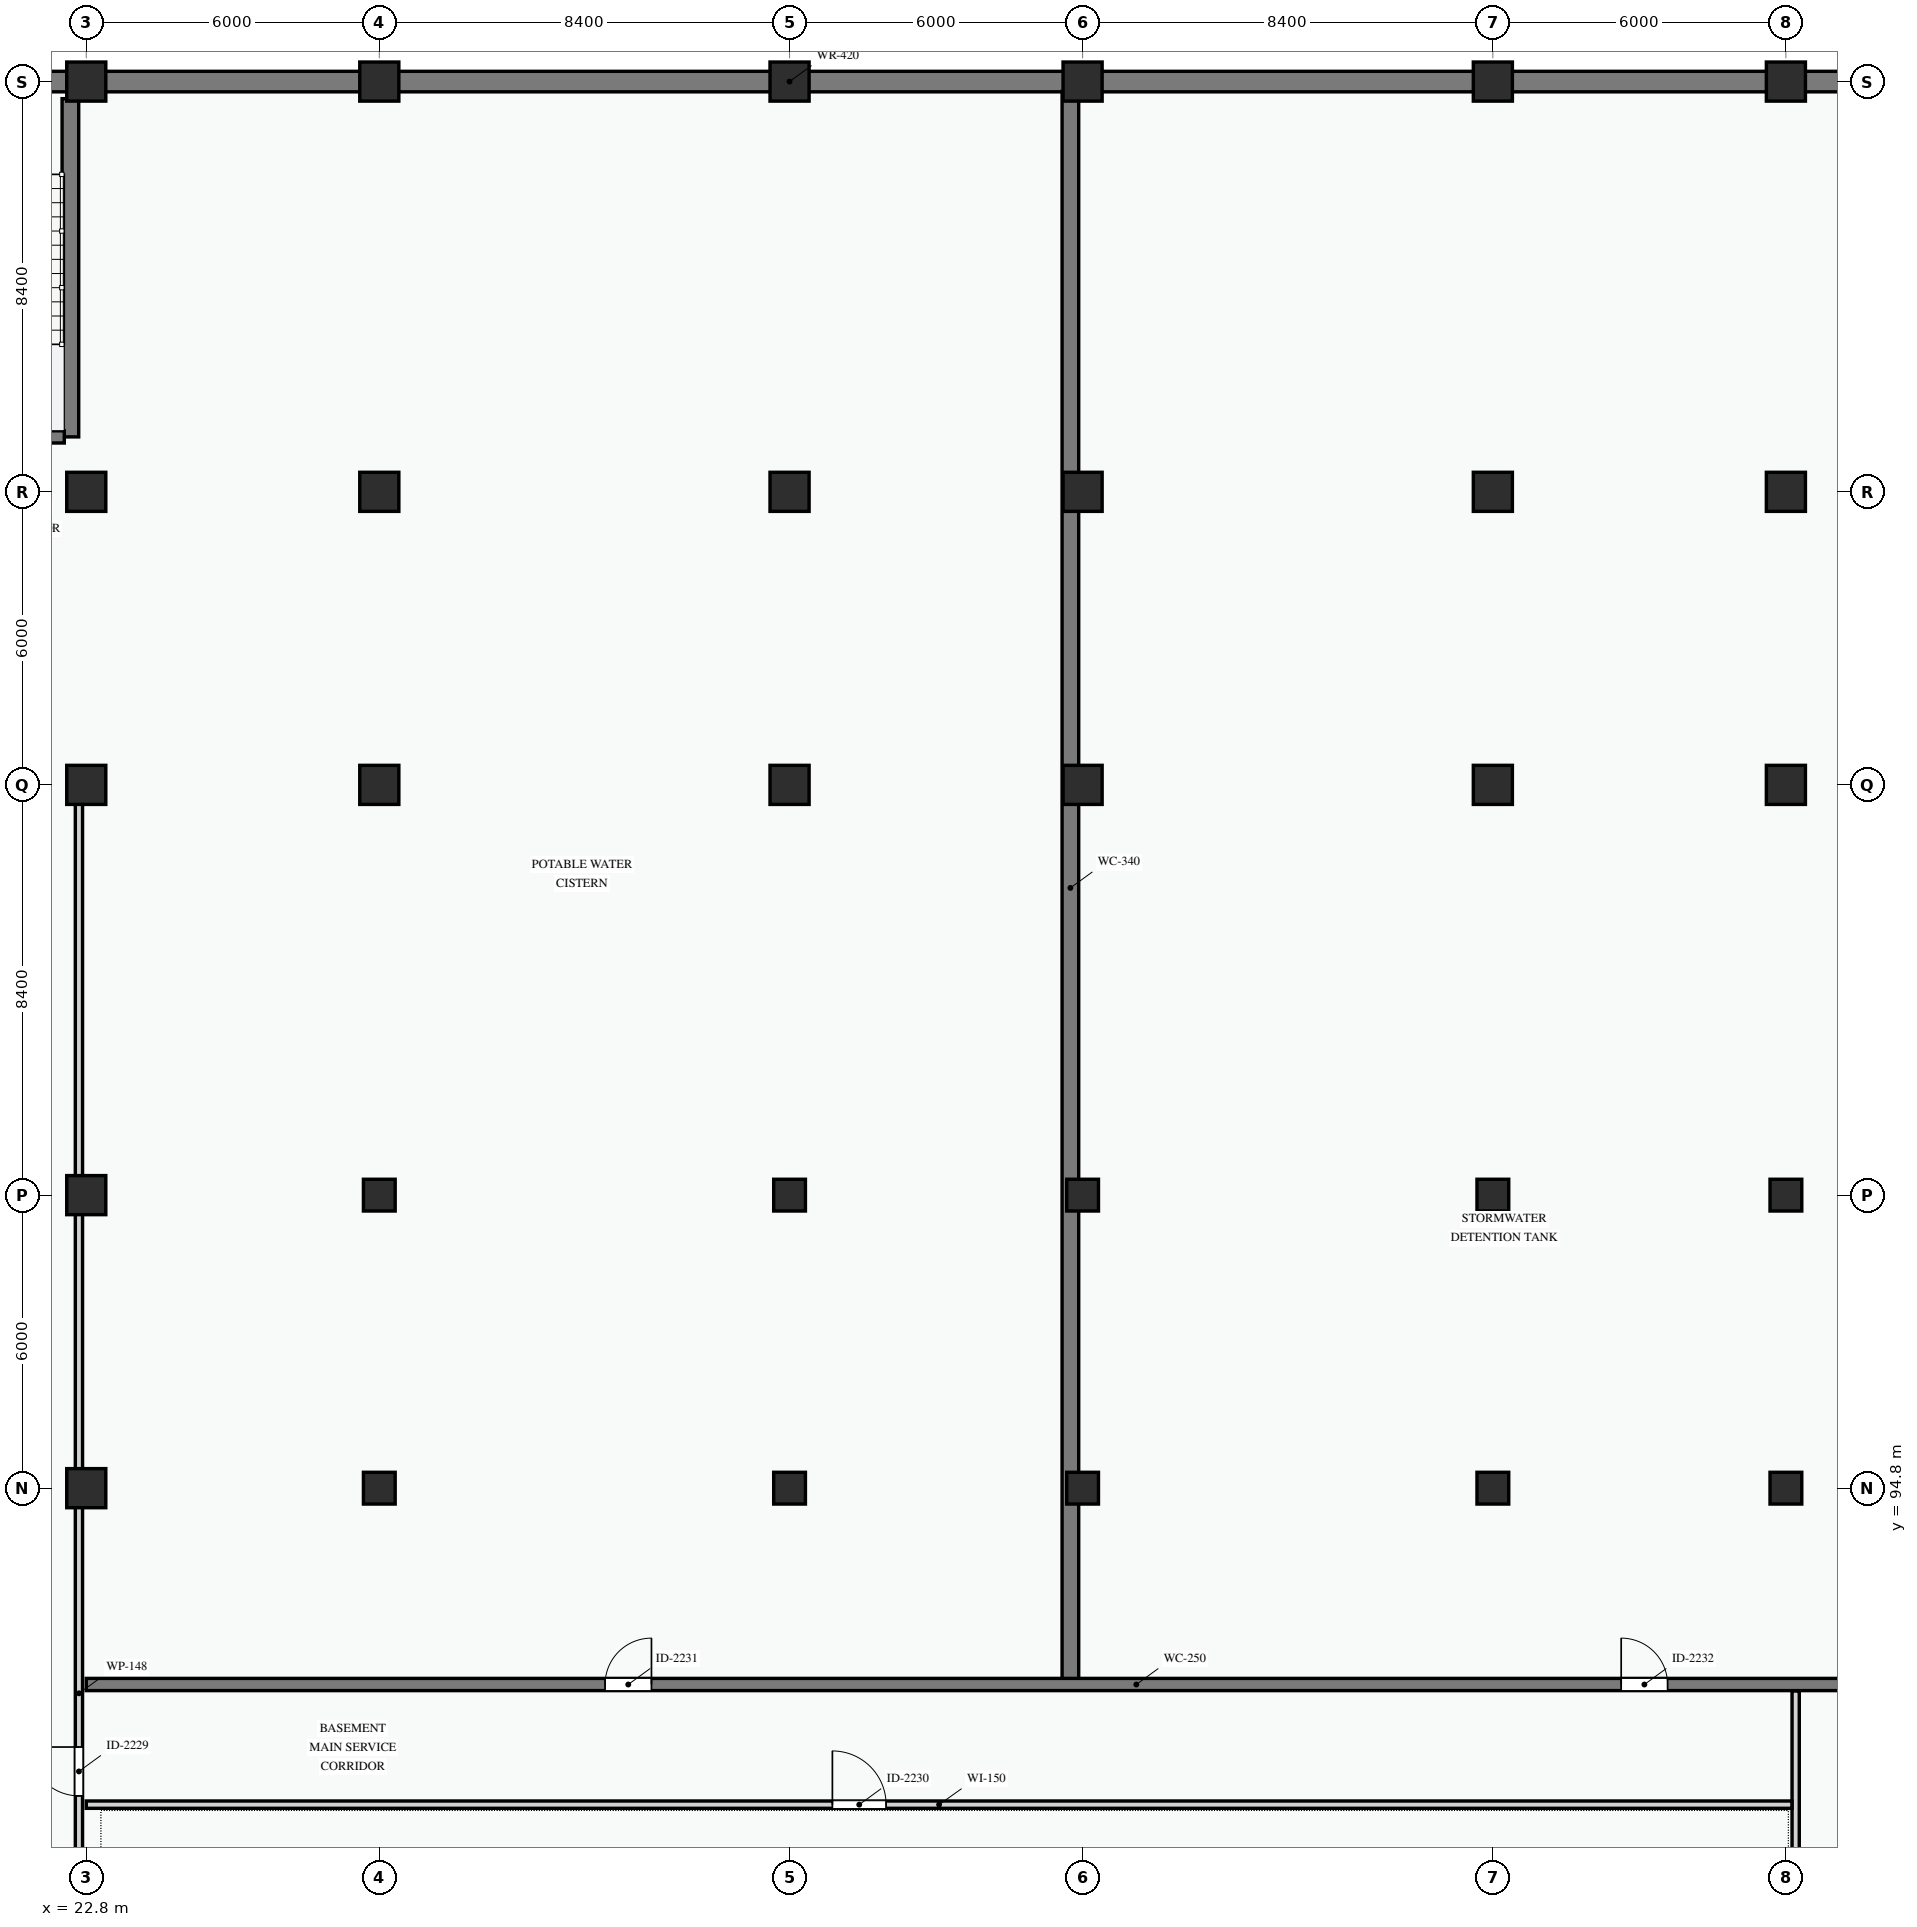
"""IFC4 building model, lengths in metres.
Left out: names, types, materials, properties, quantities, classifications, styles, units other than length and angle.
Written with IfcOpenShell. Run it as: python <this file> out.ifc"""

import sys

from ifc_helpers import new_model, si_unit, direction, frame, frame_2d, origin, origin_2d, place, context, subcontext, project, spatial, rectangle, extrude, element, fill, save


model = new_model("IFC4")
c1 = context("Model", 3, precision=1e-05, world=origin(), true_north=direction((0.0, 1.0)))
c2 = subcontext(c1, "Body", "Model", "MODEL_VIEW")
j1 = project(units=[si_unit("LENGTHUNIT", "METRE"), si_unit("PLANEANGLEUNIT", "RADIAN")], contexts=[c1])
p1 = place(None, origin())
s1 = spatial("IfcSite", under=j1, at=p1, CompositionType="ELEMENT")
p2 = place(p1, origin())
s2 = spatial("IfcBuilding", under=s1, at=p2, CompositionType="ELEMENT")
p3 = place(p2, frame((0.0, 0.0, -4.2)))
s3 = spatial("IfcBuildingStorey", under=s2, at=p3, CompositionType="ELEMENT", Elevation=-4.2)
for number, where, z_axis, x_axis in (
    (1, (22.8, 94.8, -0.45), (0.0, 0.0, 1.0), (1.0, 0.0, 0.0)),
    (2, (22.8, 100.8, -0.45), (0.0, 0.0, 1.0), (1.0, 0.0, 0.0)),
    (3, (22.8, 109.2, -0.45), (0.0, 0.0, 1.0), (1.0, 0.0, 0.0)),
    (4, (22.8, 115.2, -0.45), (0.0, 0.0, 1.0), (1.0, 0.0, 0.0)),
    (5, (22.8, 123.6, -0.45), (0.0, 0.0, 1.0), (1.0, 0.0, 0.0)),
):
    element("IfcColumn", number, at=place(p3, frame(where, z_axis=z_axis, x_axis=x_axis)), inside=s3, PredefinedType="COLUMN", context=c2, shape_type="SweptSolid", body=[
        extrude(rectangle(XDim=0.8, YDim=0.8, at=origin_2d()), origin(), (0.0, 0.0, 1.0), 4.65),
    ])
for number, where, z_axis, x_axis in (
    (6, (28.8, 94.8, -0.45), (0.0, 0.0, 1.0), (1.0, 0.0, 0.0)),
    (7, (28.8, 100.8, -0.45), (0.0, 0.0, 1.0), (1.0, 0.0, 0.0)),
):
    element("IfcColumn", number, at=place(p3, frame(where, z_axis=z_axis, x_axis=x_axis)), inside=s3, PredefinedType="COLUMN", context=c2, shape_type="SweptSolid", body=[
        extrude(rectangle(XDim=0.65, YDim=0.65, at=origin_2d()), origin(), (0.0, 0.0, 1.0), 4.65),
    ])
for number, where, z_axis, x_axis in (
    (8, (28.8, 109.2, -0.45), (0.0, 0.0, 1.0), (1.0, 0.0, 0.0)),
    (9, (28.8, 115.2, -0.45), (0.0, 0.0, 1.0), (1.0, 0.0, 0.0)),
    (10, (28.8, 123.6, -0.45), (0.0, 0.0, 1.0), (1.0, 0.0, 0.0)),
):
    element("IfcColumn", number, at=place(p3, frame(where, z_axis=z_axis, x_axis=x_axis)), inside=s3, PredefinedType="COLUMN", context=c2, shape_type="SweptSolid", body=[
        extrude(rectangle(XDim=0.8, YDim=0.8, at=origin_2d()), origin(), (0.0, 0.0, 1.0), 4.65),
    ])
for number, where, z_axis, x_axis in (
    (11, (37.2, 94.8, -0.45), (0.0, 0.0, 1.0), (1.0, 0.0, 0.0)),
    (12, (37.2, 100.8, -0.45), (0.0, 0.0, 1.0), (1.0, 0.0, 0.0)),
):
    element("IfcColumn", number, at=place(p3, frame(where, z_axis=z_axis, x_axis=x_axis)), inside=s3, PredefinedType="COLUMN", context=c2, shape_type="SweptSolid", body=[
        extrude(rectangle(XDim=0.65, YDim=0.65, at=origin_2d()), origin(), (0.0, 0.0, 1.0), 4.65),
    ])
for number, where, z_axis, x_axis in (
    (13, (37.2, 109.2, -0.45), (0.0, 0.0, 1.0), (1.0, 0.0, 0.0)),
    (14, (37.2, 115.2, -0.45), (0.0, 0.0, 1.0), (1.0, 0.0, 0.0)),
    (15, (37.2, 123.6, -0.45), (0.0, 0.0, 1.0), (1.0, 0.0, 0.0)),
):
    element("IfcColumn", number, at=place(p3, frame(where, z_axis=z_axis, x_axis=x_axis)), inside=s3, PredefinedType="COLUMN", context=c2, shape_type="SweptSolid", body=[
        extrude(rectangle(XDim=0.8, YDim=0.8, at=origin_2d()), origin(), (0.0, 0.0, 1.0), 4.65),
    ])
for number, where, z_axis, x_axis in (
    (16, (43.2, 94.8, -0.45), (0.0, 0.0, 1.0), (1.0, 0.0, 0.0)),
    (17, (43.2, 100.8, -0.45), (0.0, 0.0, 1.0), (1.0, 0.0, 0.0)),
):
    element("IfcColumn", number, at=place(p3, frame(where, z_axis=z_axis, x_axis=x_axis)), inside=s3, PredefinedType="COLUMN", context=c2, shape_type="SweptSolid", body=[
        extrude(rectangle(XDim=0.65, YDim=0.65, at=origin_2d()), origin(), (0.0, 0.0, 1.0), 4.65),
    ])
for number, where, z_axis, x_axis in (
    (18, (43.2, 109.2, -0.45), (0.0, 0.0, 1.0), (1.0, 0.0, 0.0)),
    (19, (43.2, 115.2, -0.45), (0.0, 0.0, 1.0), (1.0, 0.0, 0.0)),
    (20, (43.2, 123.6, -0.45), (0.0, 0.0, 1.0), (1.0, 0.0, 0.0)),
):
    element("IfcColumn", number, at=place(p3, frame(where, z_axis=z_axis, x_axis=x_axis)), inside=s3, PredefinedType="COLUMN", context=c2, shape_type="SweptSolid", body=[
        extrude(rectangle(XDim=0.8, YDim=0.8, at=origin_2d()), origin(), (0.0, 0.0, 1.0), 4.65),
    ])
for number, where, z_axis, x_axis in (
    (21, (51.6, 94.8, -0.45), (0.0, 0.0, 1.0), (1.0, 0.0, 0.0)),
    (22, (51.6, 100.8, -0.45), (0.0, 0.0, 1.0), (1.0, 0.0, 0.0)),
):
    element("IfcColumn", number, at=place(p3, frame(where, z_axis=z_axis, x_axis=x_axis)), inside=s3, PredefinedType="COLUMN", context=c2, shape_type="SweptSolid", body=[
        extrude(rectangle(XDim=0.65, YDim=0.65, at=origin_2d()), origin(), (0.0, 0.0, 1.0), 4.65),
    ])
for number, where, z_axis, x_axis in (
    (23, (51.6, 109.2, -0.45), (0.0, 0.0, 1.0), (1.0, 0.0, 0.0)),
    (24, (51.6, 115.2, -0.45), (0.0, 0.0, 1.0), (1.0, 0.0, 0.0)),
    (25, (51.6, 123.6, -0.45), (0.0, 0.0, 1.0), (1.0, 0.0, 0.0)),
):
    element("IfcColumn", number, at=place(p3, frame(where, z_axis=z_axis, x_axis=x_axis)), inside=s3, PredefinedType="COLUMN", context=c2, shape_type="SweptSolid", body=[
        extrude(rectangle(XDim=0.8, YDim=0.8, at=origin_2d()), origin(), (0.0, 0.0, 1.0), 4.65),
    ])
for number, where, z_axis, x_axis in (
    (26, (57.6, 94.8, -0.45), (0.0, 0.0, 1.0), (1.0, 0.0, 0.0)),
    (27, (57.6, 100.8, -0.45), (0.0, 0.0, 1.0), (1.0, 0.0, 0.0)),
):
    element("IfcColumn", number, at=place(p3, frame(where, z_axis=z_axis, x_axis=x_axis)), inside=s3, PredefinedType="COLUMN", context=c2, shape_type="SweptSolid", body=[
        extrude(rectangle(XDim=0.65, YDim=0.65, at=origin_2d()), origin(), (0.0, 0.0, 1.0), 4.65),
    ])
for number, where, z_axis, x_axis in (
    (28, (57.6, 109.2, -0.45), (0.0, 0.0, 1.0), (1.0, 0.0, 0.0)),
    (29, (57.6, 115.2, -0.45), (0.0, 0.0, 1.0), (1.0, 0.0, 0.0)),
    (30, (57.6, 123.6, -0.45), (0.0, 0.0, 1.0), (1.0, 0.0, 0.0)),
):
    element("IfcColumn", number, at=place(p3, frame(where, z_axis=z_axis, x_axis=x_axis)), inside=s3, PredefinedType="COLUMN", context=c2, shape_type="SweptSolid", body=[
        extrude(rectangle(XDim=0.8, YDim=0.8, at=origin_2d()), origin(), (0.0, 0.0, 1.0), 4.65),
    ])
p4 = place(p3, frame((66.0, 123.6, 0.0), z_axis=(0.0, 0.0, 1.0), x_axis=(-1.0, 0.0, 0.0)))
e31 = element("IfcWall", 31, at=p4, inside=s3, PredefinedType="SHEAR", context=c2, shape_type="SweptSolid", body=[
    extrude(rectangle(XDim=57.6, YDim=0.42, at=frame_2d((28.8, 0.0))), origin(), (0.0, 0.0, 1.0), 3.9),
])
p5 = place(p3, frame((22.475, 123.25, 0.0), z_axis=(0.0, 0.0, 1.0), x_axis=(0.0, -1.0, 0.0)))
e32 = element("IfcWall", 32, at=p5, inside=s3, PredefinedType="SHEAR", context=c2, shape_type="SweptSolid", body=[
    extrude(rectangle(XDim=6.925, YDim=0.34, at=frame_2d((3.462, 0.0))), origin(), (0.0, 0.0, 1.0), 3.9),
])
p6 = place(p3, frame((8.85, 116.325, 0.0), z_axis=(0.0, 0.0, 1.0), x_axis=(1.0, 0.0, 0.0)))
e33 = element("IfcWall", 33, at=p6, inside=s3, PredefinedType="SHEAR", context=c2, shape_type="SweptSolid", body=[
    extrude(rectangle(XDim=13.5, YDim=0.25, at=frame_2d((6.75, 0.0))), origin(), (0.0, 0.0, 1.0), 3.9),
])
p7 = place(p6, frame((6.2, 0.0, 0.0)))
e34 = element("IfcOpeningElement", 34, at=p7, cuts=e33, PredefinedType="OPENING", context=c2, shape_type="SweptSolid", body=[
    extrude(rectangle(XDim=1.1, YDim=2.15, at=frame_2d((0.55, 1.075))), frame((0.0, 0.135, 0.0), z_axis=(0.0, -1.0, 0.0), x_axis=(1.0, 0.0, 0.0)), (0.0, 0.0, 1.0), 0.27),
])
p8 = place(p3, frame((42.95, 90.78, 0.0), z_axis=(0.0, 0.0, 1.0), x_axis=(0.0, 1.0, 0.0)))
e35 = element("IfcWall", 35, at=p8, inside=s3, PredefinedType="SHEAR", context=c2, shape_type="SweptSolid", body=[
    extrude(rectangle(XDim=32.62, YDim=0.34, at=frame_2d((16.31, 0.0))), origin(), (0.0, 0.0, 1.0), 3.9),
])
p9 = place(p3, frame((57.8, 72.3, 0.0), z_axis=(0.0, 0.0, 1.0), x_axis=(0.0, 1.0, 0.0)))
e36 = element("IfcWall", 36, at=p9, inside=s3, PredefinedType="PARTITIONING", context=c2, shape_type="SweptSolid", body=[
    extrude(rectangle(XDim=18.35, YDim=0.148, at=frame_2d((9.175, 0.0))), origin(), (0.0, 0.0, 1.0), 3.185),
])
p10 = place(p9, frame((1.4, 0.0, 0.0)))
e37 = element("IfcOpeningElement", 37, at=p10, cuts=e36, PredefinedType="OPENING", context=c2, shape_type="SweptSolid", body=[
    extrude(rectangle(XDim=1.0, YDim=2.15, at=frame_2d((0.5, 1.075))), frame((0.0, 0.084, 0.0), z_axis=(0.0, -1.0, 0.0), x_axis=(1.0, 0.0, 0.0)), (0.0, 0.0, 1.0), 0.168),
])
p11 = place(p9, frame((10.6, 0.0, 0.0)))
e38 = element("IfcOpeningElement", 38, at=p11, cuts=e36, PredefinedType="OPENING", context=c2, shape_type="SweptSolid", body=[
    extrude(rectangle(XDim=1.0, YDim=2.15, at=frame_2d((0.5, 1.075))), frame((0.0, 0.084, 0.0), z_axis=(0.0, -1.0, 0.0), x_axis=(1.0, 0.0, 0.0)), (0.0, 0.0, 1.0), 0.168),
])
p12 = place(p3, frame((22.65, 72.0, 0.0), z_axis=(0.0, 0.0, 1.0), x_axis=(0.0, 1.0, 0.0)))
e39 = element("IfcWall", 39, at=p12, inside=s3, PredefinedType="PARTITIONING", context=c2, shape_type="SweptSolid", body=[
    extrude(rectangle(XDim=37.2, YDim=0.148, at=frame_2d((18.6, 0.0))), origin(), (0.0, 0.0, 1.0), 3.185),
])
p13 = place(p12, frame((16.5, 0.0, 0.0)))
e40 = element("IfcOpeningElement", 40, at=p13, cuts=e39, PredefinedType="OPENING", context=c2, shape_type="SweptSolid", body=[
    extrude(rectangle(XDim=1.0, YDim=2.15, at=frame_2d((0.5, 1.075))), frame((0.0, 0.084, 0.0), z_axis=(0.0, -1.0, 0.0), x_axis=(1.0, 0.0, 0.0)), (0.0, 0.0, 1.0), 0.168),
])
p14 = place(p3, frame((22.8, 88.32, 0.0), z_axis=(0.0, 0.0, 1.0), x_axis=(1.0, 0.0, 0.0)))
e41 = element("IfcWall", 41, at=p14, inside=s3, PredefinedType="PARTITIONING", context=c2, shape_type="SweptSolid", body=[
    extrude(rectangle(XDim=34.924, YDim=0.15, at=frame_2d((17.462, 0.0))), origin(), (0.0, 0.0, 1.0), 3.9),
])
p15 = place(p14, frame((15.277, 0.0, 0.0)))
e42 = element("IfcOpeningElement", 42, at=p15, cuts=e41, PredefinedType="OPENING", context=c2, shape_type="SweptSolid", body=[
    extrude(rectangle(XDim=1.1, YDim=2.15, at=frame_2d((0.55, 1.075))), frame((0.0, 0.085, 0.0), z_axis=(0.0, -1.0, 0.0), x_axis=(1.0, 0.0, 0.0)), (0.0, 0.0, 1.0), 0.17),
])
p16 = place(p3, frame((22.8, 90.78, 0.0), z_axis=(0.0, 0.0, 1.0), x_axis=(1.0, 0.0, 0.0)))
e43 = element("IfcWall", 43, at=p16, inside=s3, PredefinedType="SHEAR", context=c2, shape_type="SweptSolid", body=[
    extrude(rectangle(XDim=43.0, YDim=0.25, at=frame_2d((21.5, 0.0))), origin(), (0.0, 0.0, 1.0), 3.9),
])
p17 = place(p16, frame((10.623, 0.0, 0.0)))
e44 = element("IfcOpeningElement", 44, at=p17, cuts=e43, PredefinedType="OPENING", context=c2, shape_type="SweptSolid", body=[
    extrude(rectangle(XDim=0.95, YDim=2.1, at=frame_2d((0.475, 1.05))), frame((0.0, 0.135, 0.0), z_axis=(0.0, -1.0, 0.0), x_axis=(1.0, 0.0, 0.0)), (0.0, 0.0, 1.0), 0.27),
])
p18 = place(p16, frame((31.427, 0.0, 0.0)))
e45 = element("IfcOpeningElement", 45, at=p18, cuts=e43, PredefinedType="OPENING", context=c2, shape_type="SweptSolid", body=[
    extrude(rectangle(XDim=0.95, YDim=2.1, at=frame_2d((0.475, 1.05))), frame((0.0, 0.135, 0.0), z_axis=(0.0, -1.0, 0.0), x_axis=(1.0, 0.0, 0.0)), (0.0, 0.0, 1.0), 0.27),
])
p19 = place(p13, origin())
e46 = element("IfcDoor", 46, at=p19, inside=s3, OperationType="SINGLE_SWING_RIGHT", PredefinedType="DOOR", context=c2, shape_type="SweptSolid", body=[
    extrude(rectangle(XDim=1.0, YDim=2.15, at=frame_2d((0.5, 1.075))), frame((0.0, 0.025, 0.0), z_axis=(0.0, -1.0, 0.0), x_axis=(1.0, 0.0, 0.0)), (0.0, 0.0, 1.0), 0.05),
])
fill(e40, e46)
p20 = place(p15, origin())
e47 = element("IfcDoor", 47, at=p20, inside=s3, OperationType="SINGLE_SWING_LEFT", PredefinedType="DOOR", context=c2, shape_type="SweptSolid", body=[
    extrude(rectangle(XDim=1.1, YDim=2.15, at=frame_2d((0.55, 1.075))), frame((0.0, 0.025, 0.0), z_axis=(0.0, -1.0, 0.0), x_axis=(1.0, 0.0, 0.0)), (0.0, 0.0, 1.0), 0.05),
])
fill(e42, e47)
p21 = place(p17, origin())
e48 = element("IfcDoor", 48, at=p21, inside=s3, OperationType="SINGLE_SWING_RIGHT", PredefinedType="DOOR", context=c2, shape_type="SweptSolid", body=[
    extrude(rectangle(XDim=0.95, YDim=2.1, at=frame_2d((0.475, 1.05))), frame((0.0, 0.025, 0.0), z_axis=(0.0, -1.0, 0.0), x_axis=(1.0, 0.0, 0.0)), (0.0, 0.0, 1.0), 0.05),
])
fill(e44, e48)
p22 = place(p18, origin())
e49 = element("IfcDoor", 49, at=p22, inside=s3, OperationType="SINGLE_SWING_LEFT", PredefinedType="DOOR", context=c2, shape_type="SweptSolid", body=[
    extrude(rectangle(XDim=0.95, YDim=2.1, at=frame_2d((0.475, 1.05))), frame((0.0, 0.025, 0.0), z_axis=(0.0, -1.0, 0.0), x_axis=(1.0, 0.0, 0.0)), (0.0, 0.0, 1.0), 0.05),
])
fill(e45, e49)
save(model, sys.argv[1])
